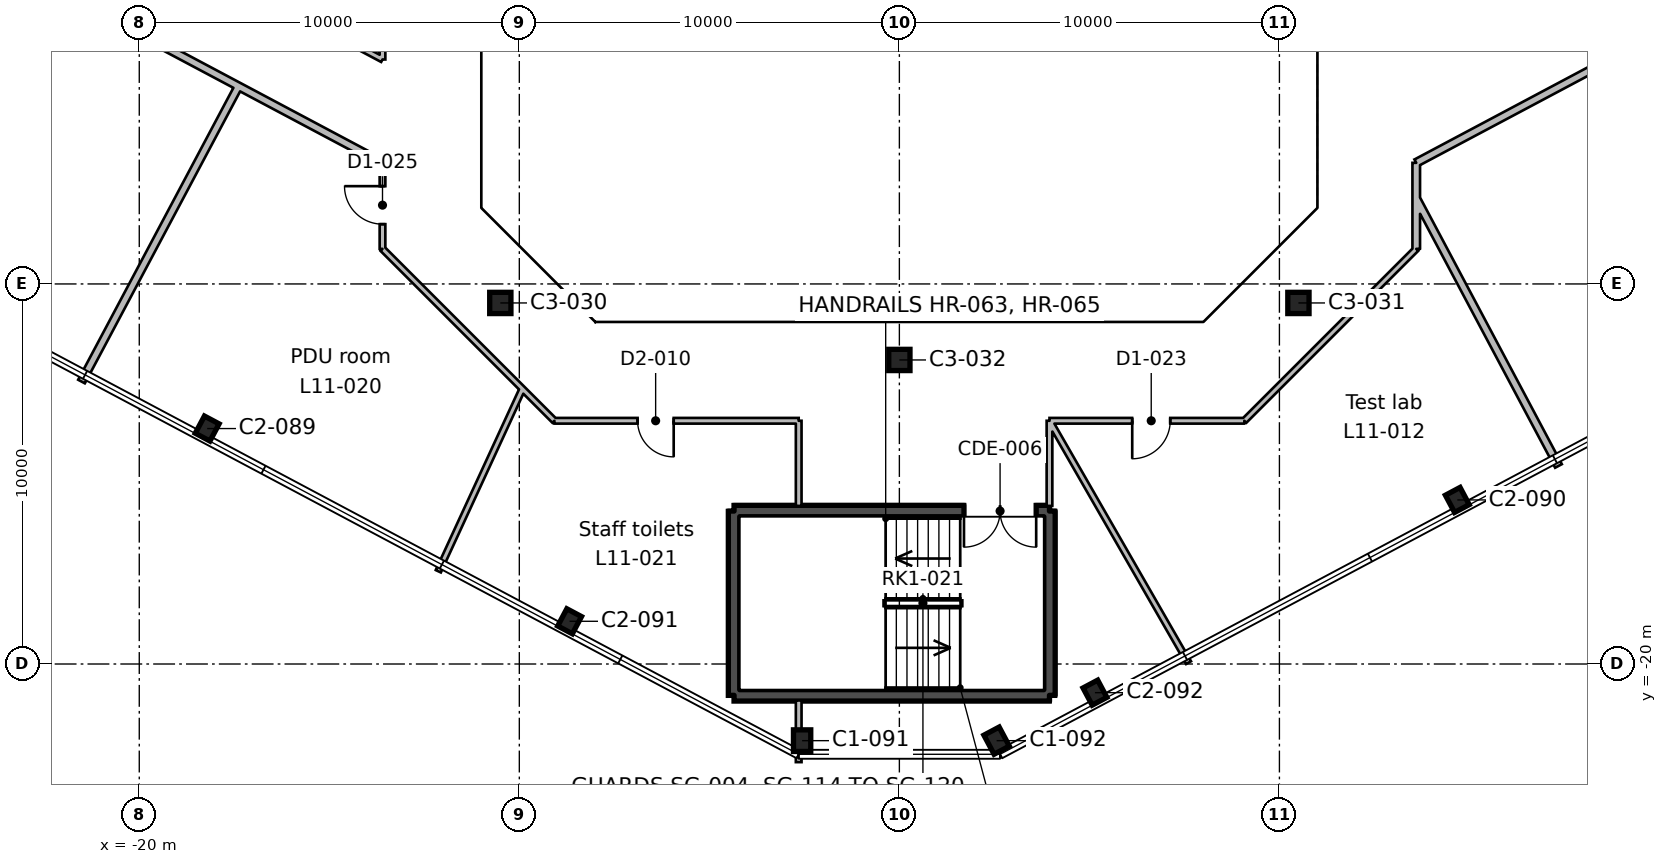
"""IFC4 building model, lengths in metres.
Left out: names, types, materials, properties, quantities, classifications, styles, units other than length and angle.
Written with IfcOpenShell. Run it as: python <this file> out.ifc"""

import sys

from ifc_helpers import new_model, si_unit, direction, frame, frame_2d, origin, origin_2d, place, context, subcontext, project, spatial, rectangle, hollow_rectangle, i_section, extrude, element, fill, save


model = new_model("IFC4")
c1 = context("Model", 3, precision=1e-05, world=origin(), true_north=direction((0.0, 1.0)))
c2 = subcontext(c1, "Body", "Model", "MODEL_VIEW")
j1 = project(units=[si_unit("LENGTHUNIT", "METRE"), si_unit("PLANEANGLEUNIT", "RADIAN")], contexts=[c1])
p1 = place(None, origin())
s1 = spatial("IfcSite", under=j1, at=p1, CompositionType="ELEMENT")
p2 = place(p1, origin())
s2 = spatial("IfcBuilding", under=s1, at=p2, CompositionType="ELEMENT")
p3 = place(p2, frame((0.0, 0.0, 60.8)))
s3 = spatial("IfcBuildingStorey", under=s2, at=p3, CompositionType="ELEMENT", Elevation=60.8)
for number, where, z_axis, x_axis in (
    (1, (-2.559, -22.017, 0.0), (0.0, 0.0, 1.0), (1.0, 0.0, 0.0)),
    (2, (2.559, -22.017, 0.0), (0.0, 0.0, 1.0), (0.883, 0.469, 0.0)),
):
    element("IfcColumn", number, at=place(p3, frame(where, z_axis=z_axis, x_axis=x_axis)), inside=s3, PredefinedType="COLUMN", context=c2, shape_type="SweptSolid", body=[
        extrude(i_section(OverallWidth=0.455, OverallDepth=0.569, WebThickness=0.078, FlangeThickness=0.125, FilletRadius=0.015, at=origin_2d()), origin(), (0.0, 0.0, 1.0), 5.4),
    ])
for number, where, z_axis, x_axis in (
    (3, (5.146, -20.754, 0.0), (0.0, 0.0, 1.0), (0.883, 0.469, 0.0)),
    (4, (-8.677, -18.876, 0.0), (0.0, 0.0, 1.0), (0.883, -0.469, 0.0)),
    (5, (14.681, -15.683, 0.0), (0.0, 0.0, 1.0), (0.883, 0.469, 0.0)),
    (6, (-18.213, -13.805, 0.0), (0.0, 0.0, 1.0), (0.883, -0.469, 0.0)),
):
    element("IfcColumn", number, at=place(p3, frame(where, z_axis=z_axis, x_axis=x_axis)), inside=s3, PredefinedType="COLUMN", context=c2, shape_type="SweptSolid", body=[
        extrude(i_section(OverallWidth=0.437, OverallDepth=0.513, WebThickness=0.061, FlangeThickness=0.097, FilletRadius=0.015, at=origin_2d()), origin(), (0.0, 0.0, 1.0), 5.4),
    ])
for number, where, z_axis, x_axis in (
    (7, (0.0, -12.0, 0.0), (0.0, 0.0, 1.0), (1.0, 0.0, 0.0)),
    (8, (-10.5, -10.5, 0.0), (0.0, 0.0, 1.0), (1.0, 0.0, 0.0)),
    (9, (10.5, -10.5, 0.0), (0.0, 0.0, 1.0), (1.0, 0.0, 0.0)),
):
    element("IfcColumn", number, at=place(p3, frame(where, z_axis=z_axis, x_axis=x_axis)), inside=s3, PredefinedType="COLUMN", context=c2, shape_type="SweptSolid", body=[
        extrude(hollow_rectangle(XDim=0.559, YDim=0.559, WallThickness=0.024, InnerFilletRadius=0.012, OuterFilletRadius=0.035, at=origin_2d()), origin(), (0.0, 0.0, 1.0), 5.4),
    ])
p4 = place(p3, frame((3.95, -15.975, 0.0), z_axis=(0.0, 0.0, 1.0), x_axis=(0.0, -1.0, 0.0)))
e10 = element("IfcWall", 10, at=p4, inside=s3, PredefinedType="SHEAR", context=c2, shape_type="SweptSolid", body=[
    extrude(rectangle(XDim=4.85, YDim=0.3, at=frame_2d((2.425, 0.0))), origin(), (0.0, 0.0, 1.0), 5.4),
])
p5 = place(p3, frame((3.95, -20.825, 0.0), z_axis=(0.0, 0.0, 1.0), x_axis=(-1.0, 0.0, 0.0)))
e11 = element("IfcWall", 11, at=p5, inside=s3, PredefinedType="SHEAR", context=c2, shape_type="SweptSolid", body=[
    extrude(rectangle(XDim=8.3, YDim=0.3, at=frame_2d((4.15, 0.0))), origin(), (0.0, 0.0, 1.0), 5.4),
])
p6 = place(p3, frame((-4.35, -20.825, 0.0), z_axis=(0.0, 0.0, 1.0), x_axis=(0.0, 1.0, 0.0)))
e12 = element("IfcWall", 12, at=p6, inside=s3, PredefinedType="SHEAR", context=c2, shape_type="SweptSolid", body=[
    extrude(rectangle(XDim=4.85, YDim=0.3, at=frame_2d((2.425, 0.0))), origin(), (0.0, 0.0, 1.0), 5.4),
])
p7 = place(p3, frame((-4.35, -15.975, 0.0), z_axis=(0.0, 0.0, 1.0), x_axis=(1.0, 0.0, 0.0)))
e13 = element("IfcWall", 13, at=p7, inside=s3, PredefinedType="SHEAR", context=c2, shape_type="SweptSolid", body=[
    extrude(rectangle(XDim=8.3, YDim=0.3, at=frame_2d((4.15, 0.0))), origin(), (0.0, 0.0, 1.0), 5.4),
])
p8 = place(p7, frame((6.05, 0.0, 0.0)))
e14 = element("IfcOpeningElement", 14, at=p8, cuts=e13, PredefinedType="OPENING", context=c2, shape_type="SweptSolid", body=[
    extrude(rectangle(XDim=1.9, YDim=2.1, at=frame_2d((0.95, 1.05))), frame((0.0, 0.16, 0.0), z_axis=(0.0, -1.0, 0.0), x_axis=(1.0, 0.0, 0.0)), (0.0, 0.0, 1.0), 0.32),
])
p9 = place(p3, frame((-13.6, -6.813, 0.0), z_axis=(0.0, 0.0, 1.0), x_axis=(-0.882934546757, 0.469496098113, 0.0)))
e15 = element("IfcWall", 15, at=p9, inside=s3, PredefinedType="PARTITIONING", context=c2, shape_type="SweptSolid", body=[
    extrude(rectangle(XDim=36.758, YDim=0.2, at=frame_2d((18.379, 0.0))), origin(), (0.0, 0.0, 1.0), 5.0),
])
p10 = place(p9, frame((20.35, 0.0, 0.0)))
e16 = element("IfcOpeningElement", 16, at=p10, cuts=e15, PredefinedType="OPENING", context=c2, shape_type="SweptSolid", body=[
    extrude(rectangle(XDim=1.0, YDim=2.1, at=frame_2d((0.5, 1.05))), frame((0.0, 0.11, 0.0), z_axis=(0.0, -1.0, 0.0), x_axis=(1.0, 0.0, 0.0)), (0.0, 0.0, 1.0), 0.22),
])
p11 = place(p9, frame((17.85, 0.0, 0.0)))
e17 = element("IfcOpeningElement", 17, at=p11, cuts=e15, PredefinedType="OPENING", context=c2, shape_type="SweptSolid", body=[
    extrude(rectangle(XDim=1.0, YDim=2.1, at=frame_2d((0.5, 1.05))), frame((0.0, 0.11, 0.0), z_axis=(0.0, -1.0, 0.0), x_axis=(1.0, 0.0, 0.0)), (0.0, 0.0, 1.0), 0.22),
])
p12 = place(p3, frame((-17.388, -4.798, 0.0), z_axis=(0.0, 0.0, 1.0), x_axis=(-0.469532456729, -0.882915212281, 0.0)))
e18 = element("IfcWall", 18, at=p12, inside=s3, PredefinedType="PARTITIONING", context=c2, shape_type="SweptSolid", body=[
    extrude(rectangle(XDim=8.8, YDim=0.2, at=frame_2d((4.4, 0.0))), origin(), (0.0, 0.0, 1.0), 5.0),
])
p13 = place(p3, frame((-9.918, -12.759, 0.0), z_axis=(0.0, 0.0, 1.0), x_axis=(-0.707106781187, 0.707106781187, 0.0)))
e19 = element("IfcWall", 19, at=p13, inside=s3, PredefinedType="PARTITIONING", context=c2, shape_type="SweptSolid", body=[
    extrude(rectangle(XDim=5.207, YDim=0.15, at=frame_2d((2.604, 0.0))), origin(), (0.0, 0.0, 1.0), 5.0),
])
p14 = place(p3, frame((-13.6, -9.077, 0.0), z_axis=(0.0, 0.0, 1.0), x_axis=(0.0, 1.0, 0.0)))
e20 = element("IfcWall", 20, at=p14, inside=s3, PredefinedType="PARTITIONING", context=c2, shape_type="SweptSolid", body=[
    extrude(rectangle(XDim=2.249, YDim=0.15, at=frame_2d((1.125, 0.0))), origin(), (0.0, 0.0, 1.0), 5.0),
])
p15 = place(p14, frame((0.65, 0.0, 0.0)))
e21 = element("IfcOpeningElement", 21, at=p15, cuts=e20, PredefinedType="OPENING", context=c2, shape_type="SweptSolid", body=[
    extrude(rectangle(XDim=1.0, YDim=2.1, at=frame_2d((0.5, 1.05))), frame((0.0, 0.085, 0.0), z_axis=(0.0, -1.0, 0.0), x_axis=(1.0, 0.0, 0.0)), (0.0, 0.0, 1.0), 0.17),
])
p16 = place(p3, frame((-9.918, -12.759, 0.0), z_axis=(0.0, 0.0, 1.0), x_axis=(-0.41878582264, -0.908085037183, 0.0)))
e22 = element("IfcWall", 22, at=p16, inside=s3, PredefinedType="PARTITIONING", context=c2, shape_type="SweptSolid", body=[
    extrude(rectangle(XDim=5.287, YDim=0.15, at=frame_2d((2.644, 0.0))), origin(), (0.0, 0.0, 1.0), 5.0),
])
p17 = place(p3, frame((-3.888, -13.6, 0.0), z_axis=(0.0, 0.0, 1.0), x_axis=(-1.0, 0.0, 0.0)))
e23 = element("IfcWall", 23, at=p17, inside=s3, PredefinedType="PARTITIONING", context=c2, shape_type="SweptSolid", body=[
    extrude(rectangle(XDim=5.189, YDim=0.15, at=frame_2d((2.594, 0.0))), origin(), (0.0, 0.0, 1.0), 5.0),
])
p18 = place(p17, frame((2.05, 0.0, 0.0)))
e24 = element("IfcOpeningElement", 24, at=p18, cuts=e23, PredefinedType="OPENING", context=c2, shape_type="SweptSolid", body=[
    extrude(rectangle(XDim=0.95, YDim=2.1, at=frame_2d((0.475, 1.05))), frame((0.0, 0.085, 0.0), z_axis=(0.0, -1.0, 0.0), x_axis=(1.0, 0.0, 0.0)), (0.0, 0.0, 1.0), 0.17),
])
p19 = place(p3, frame((-9.077, -13.6, 0.0), z_axis=(0.0, 0.0, 1.0), x_axis=(-0.707106781187, 0.707106781187, 0.0)))
e25 = element("IfcWall", 25, at=p19, inside=s3, PredefinedType="PARTITIONING", context=c2, shape_type="SweptSolid", body=[
    extrude(rectangle(XDim=1.189, YDim=0.15, at=frame_2d((0.595, 0.0))), origin(), (0.0, 0.0, 1.0), 5.0),
])
p20 = place(p3, frame((-2.649, -15.84, 0.0), z_axis=(0.0, 0.0, 1.0), x_axis=(0.0, 1.0, 0.0)))
e26 = element("IfcWall", 26, at=p20, inside=s3, PredefinedType="PARTITIONING", context=c2, shape_type="SweptSolid", body=[
    extrude(rectangle(XDim=2.24, YDim=0.15, at=frame_2d((1.12, 0.0))), origin(), (0.0, 0.0, 1.0), 5.0),
])
p21 = place(p3, frame((-2.649, -13.6, 0.0), z_axis=(0.0, 0.0, 1.0), x_axis=(-1.0, 0.0, 0.0)))
e27 = element("IfcWall", 27, at=p21, inside=s3, PredefinedType="PARTITIONING", context=c2, shape_type="SweptSolid", body=[
    extrude(rectangle(XDim=1.239, YDim=0.15, at=frame_2d((0.62, 0.0))), origin(), (0.0, 0.0, 1.0), 5.0),
])
p22 = place(p3, frame((-2.649, -20.96, 0.0), z_axis=(0.0, 0.0, 1.0), x_axis=(0.0, -1.0, 0.0)))
e28 = element("IfcWall", 28, at=p22, inside=s3, PredefinedType="PARTITIONING", context=c2, shape_type="SweptSolid", body=[
    extrude(rectangle(XDim=1.622, YDim=0.15, at=frame_2d((0.811, 0.0))), origin(), (0.0, 0.0, 1.0), 5.0),
])
p23 = place(p3, frame((3.95, -13.6, 0.0), z_axis=(0.0, 0.0, 1.0), x_axis=(0.0, -1.0, 0.0)))
e29 = element("IfcWall", 29, at=p23, inside=s3, PredefinedType="PARTITIONING", context=c2, shape_type="SweptSolid", body=[
    extrude(rectangle(XDim=2.24, YDim=0.15, at=frame_2d((1.12, 0.0))), origin(), (0.0, 0.0, 1.0), 5.0),
])
p24 = place(p3, frame((13.6, -7.756, 0.0), z_axis=(0.0, 0.0, 1.0), x_axis=(0.0, -1.0, 0.0)))
e30 = element("IfcWall", 30, at=p24, inside=s3, PredefinedType="PARTITIONING", context=c2, shape_type="SweptSolid", body=[
    extrude(rectangle(XDim=1.321, YDim=0.2, at=frame_2d((0.66, 0.0))), origin(), (0.0, 0.0, 1.0), 5.0),
])
p25 = place(p3, frame((13.6, -9.077, 0.0), z_axis=(0.0, 0.0, 1.0), x_axis=(-0.707106781187, -0.707106781187, 0.0)))
e31 = element("IfcWall", 31, at=p25, inside=s3, PredefinedType="PARTITIONING", context=c2, shape_type="SweptSolid", body=[
    extrude(rectangle(XDim=6.397, YDim=0.15, at=frame_2d((3.198, 0.0))), origin(), (0.0, 0.0, 1.0), 5.0),
])
p26 = place(p3, frame((9.077, -13.6, 0.0), z_axis=(0.0, 0.0, 1.0), x_axis=(-1.0, 0.0, 0.0)))
e32 = element("IfcWall", 32, at=p26, inside=s3, PredefinedType="PARTITIONING", context=c2, shape_type="SweptSolid", body=[
    extrude(rectangle(XDim=5.127, YDim=0.15, at=frame_2d((2.563, 0.0))), origin(), (0.0, 0.0, 1.0), 5.0),
])
p27 = place(p26, frame((1.95, 0.0, 0.0)))
e33 = element("IfcOpeningElement", 33, at=p27, cuts=e32, PredefinedType="OPENING", context=c2, shape_type="SweptSolid", body=[
    extrude(rectangle(XDim=1.0, YDim=2.1, at=frame_2d((0.5, 1.05))), frame((0.0, 0.085, 0.0), z_axis=(0.0, -1.0, 0.0), x_axis=(1.0, 0.0, 0.0)), (0.0, 0.0, 1.0), 0.17),
])
p28 = place(p3, frame((7.609, -19.965, 0.0), z_axis=(0.0, 0.0, 1.0), x_axis=(-0.498375530061, 0.866961262708, 0.0)))
e34 = element("IfcWall", 34, at=p28, inside=s3, PredefinedType="PARTITIONING", context=c2, shape_type="SweptSolid", body=[
    extrude(rectangle(XDim=7.342, YDim=0.15, at=frame_2d((3.671, 0.0))), origin(), (0.0, 0.0, 1.0), 5.0),
])
p29 = place(p3, frame((13.6, -7.75, 0.0), z_axis=(0.0, 0.0, 1.0), x_axis=(0.469489555723, -0.882938025609, 0.0)))
e35 = element("IfcWall", 35, at=p29, inside=s3, PredefinedType="PARTITIONING", context=c2, shape_type="SweptSolid", body=[
    extrude(rectangle(XDim=7.972, YDim=0.2, at=frame_2d((3.986, 0.0))), origin(), (0.0, 0.0, 1.0), 5.0),
])
p30 = place(p3, frame((69.57, 22.948, 0.0), z_axis=(0.0, 0.0, 1.0), x_axis=(-0.882939582192, -0.469486628349, 0.0)))
e36 = element("IfcWall", 36, at=p30, inside=s3, PredefinedType="PARTITIONING", context=c2, shape_type="SweptSolid", body=[
    extrude(rectangle(XDim=63.39, YDim=0.2, at=frame_2d((31.695, 0.0))), origin(), (0.0, 0.0, 1.0), 5.0),
])
p31 = place(p30, frame((41.971, 0.0, 0.0)))
e37 = element("IfcOpeningElement", 37, at=p31, cuts=e36, PredefinedType="OPENING", context=c2, shape_type="SweptSolid", body=[
    extrude(rectangle(XDim=1.0, YDim=2.1, at=frame_2d((0.5, 1.05))), frame((0.0, 0.11, 0.0), z_axis=(0.0, -1.0, 0.0), x_axis=(1.0, 0.0, 0.0)), (0.0, 0.0, 1.0), 0.22),
])
p32 = place(p30, frame((31.371, 0.0, 0.0)))
e38 = element("IfcOpeningElement", 38, at=p32, cuts=e36, PredefinedType="OPENING", context=c2, shape_type="SweptSolid", body=[
    extrude(rectangle(XDim=1.0, YDim=2.1, at=frame_2d((0.5, 1.05))), frame((0.0, 0.11, 0.0), z_axis=(0.0, -1.0, 0.0), x_axis=(1.0, 0.0, 0.0)), (0.0, 0.0, 1.0), 0.22),
])
p33 = place(p30, frame((29.571, 0.0, 0.0)))
e39 = element("IfcOpeningElement", 39, at=p33, cuts=e36, PredefinedType="OPENING", context=c2, shape_type="SweptSolid", body=[
    extrude(rectangle(XDim=1.0, YDim=2.1, at=frame_2d((0.5, 1.05))), frame((0.0, 0.11, 0.0), z_axis=(0.0, -1.0, 0.0), x_axis=(1.0, 0.0, 0.0)), (0.0, 0.0, 1.0), 0.22),
])
p34 = place(p30, frame((13.071, 0.0, 0.0)))
e40 = element("IfcOpeningElement", 40, at=p34, cuts=e36, PredefinedType="OPENING", context=c2, shape_type="SweptSolid", body=[
    extrude(rectangle(XDim=1.0, YDim=2.1, at=frame_2d((0.5, 1.05))), frame((0.0, 0.11, 0.0), z_axis=(0.0, -1.0, 0.0), x_axis=(1.0, 0.0, 0.0)), (0.0, 0.0, 1.0), 0.22),
])
p35 = place(p3, frame((13.6, -6.813, 0.0), z_axis=(0.0, 0.0, 1.0), x_axis=(0.0, -1.0, 0.0)))
e41 = element("IfcWall", 41, at=p35, inside=s3, PredefinedType="PARTITIONING", context=c2, shape_type="SweptSolid", body=[
    extrude(rectangle(XDim=0.943, YDim=0.2, at=frame_2d((0.472, 0.0))), origin(), (0.0, 0.0, 1.0), 5.0),
])
p36 = place(p3, frame((-13.6, 9.077, 0.0), z_axis=(0.0, 0.0, 1.0), x_axis=(0.0, -1.0, 0.0)))
e42 = element("IfcWall", 42, at=p36, inside=s3, PredefinedType="PARTITIONING", context=c2, shape_type="SweptSolid", body=[
    extrude(rectangle(XDim=13.171, YDim=0.15, at=frame_2d((6.585, 0.0))), origin(), (0.0, 0.0, 1.0), 5.0),
])
p37 = place(p3, frame((-13.6, -4.094, 0.0), z_axis=(0.0, 0.0, 1.0), x_axis=(-0.882967890474, 0.469433386533, 0.0)))
e43 = element("IfcWall", 43, at=p37, inside=s3, PredefinedType="PARTITIONING", context=c2, shape_type="SweptSolid", body=[
    extrude(rectangle(XDim=7.914, YDim=0.15, at=frame_2d((3.957, 0.0))), origin(), (0.0, 0.0, 1.0), 5.0),
])
p38 = place(p8, frame((1.9, 0.0, 0.0), z_axis=(0.0, 0.0, 1.0), x_axis=(-1.0, 0.0, 0.0)))
e44 = element("IfcDoor", 44, at=p38, inside=s3, OperationType="DOUBLE_DOOR_SINGLE_SWING", PredefinedType="DOOR", context=c2, shape_type="SweptSolid", body=[
    extrude(rectangle(XDim=1.9, YDim=2.1, at=frame_2d((0.95, 1.05))), frame((0.0, 0.025, 0.0), z_axis=(0.0, -1.0, 0.0), x_axis=(1.0, 0.0, 0.0)), (0.0, 0.0, 1.0), 0.05),
])
fill(e14, e44)
p39 = place(p27, origin())
e45 = element("IfcDoor", 45, at=p39, inside=s3, OperationType="SINGLE_SWING_RIGHT", PredefinedType="DOOR", context=c2, shape_type="SweptSolid", body=[
    extrude(rectangle(XDim=1.0, YDim=2.1, at=frame_2d((0.5, 1.05))), frame((0.0, 0.025, 0.0), z_axis=(0.0, -1.0, 0.0), x_axis=(1.0, 0.0, 0.0)), (0.0, 0.0, 1.0), 0.05),
])
fill(e33, e45)
p40 = place(p15, origin())
e46 = element("IfcDoor", 46, at=p40, inside=s3, OperationType="SINGLE_SWING_RIGHT", PredefinedType="DOOR", context=c2, shape_type="SweptSolid", body=[
    extrude(rectangle(XDim=1.0, YDim=2.1, at=frame_2d((0.5, 1.05))), frame((0.0, 0.025, 0.0), z_axis=(0.0, -1.0, 0.0), x_axis=(1.0, 0.0, 0.0)), (0.0, 0.0, 1.0), 0.05),
])
fill(e21, e46)
p41 = place(p18, origin())
e47 = element("IfcDoor", 47, at=p41, inside=s3, OperationType="SINGLE_SWING_LEFT", PredefinedType="DOOR", context=c2, shape_type="SweptSolid", body=[
    extrude(rectangle(XDim=0.95, YDim=2.1, at=frame_2d((0.475, 1.05))), frame((0.0, 0.025, 0.0), z_axis=(0.0, -1.0, 0.0), x_axis=(1.0, 0.0, 0.0)), (0.0, 0.0, 1.0), 0.05),
])
fill(e24, e47)
save(model, sys.argv[1])
